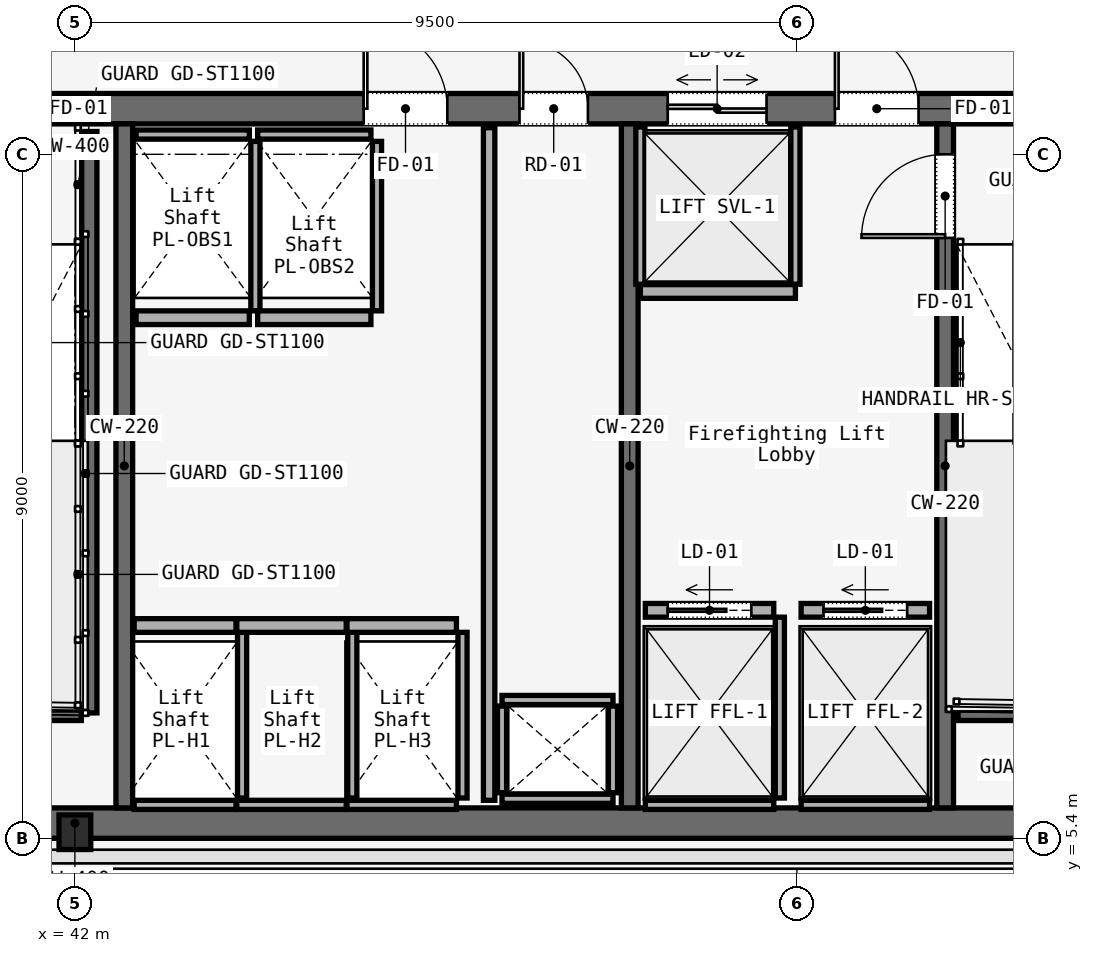
"""IFC4 building model, lengths in metres.
Left out: names, types, materials, properties, quantities, classifications, styles, units other than length and angle.
Written with IfcOpenShell. Run it as: python <this file> out.ifc"""

import sys

from ifc_helpers import new_model, si_unit, direction, frame, frame_2d, origin, origin_2d, place, context, subcontext, project, spatial, rectangle, i_section, extrude, element, fill, save


model = new_model("IFC4")
c1 = context("Model", 3, precision=1e-05, world=origin(), true_north=direction((0.0, 1.0)))
c2 = subcontext(c1, "Body", "Model", "MODEL_VIEW")
j1 = project(units=[si_unit("LENGTHUNIT", "METRE"), si_unit("PLANEANGLEUNIT", "RADIAN")], contexts=[c1])
p1 = place(None, origin())
s1 = spatial("IfcSite", under=j1, at=p1, CompositionType="ELEMENT")
p2 = place(p1, origin())
s2 = spatial("IfcBuilding", under=s1, at=p2, CompositionType="ELEMENT")
p3 = place(p2, frame((0.0, 0.0, 187.8)))
s3 = spatial("IfcBuildingStorey", under=s2, at=p3, CompositionType="ELEMENT", Elevation=187.8)
p4 = place(p3, frame((26.45, 15.0, 0.0), z_axis=(0.0, 0.0, 1.0), x_axis=(1.0, 0.0, 0.0)))
e1 = element("IfcWall", 1, at=p4, inside=s3, PredefinedType="SOLIDWALL", context=c2, shape_type="SweptSolid", body=[
    extrude(rectangle(XDim=31.1, YDim=0.4, at=frame_2d((15.55, 0.0))), origin(), (0.0, 0.0, 1.0), 3.58),
])
p5 = place(p4, frame((1.65, 0.0, 0.0)))
e2 = element("IfcOpeningElement", 2, at=p5, cuts=e1, PredefinedType="OPENING", context=c2, shape_type="SweptSolid", body=[
    extrude(rectangle(XDim=1.1, YDim=2.2, at=frame_2d((0.55, 1.1))), frame((0.0, 0.2, 0.0), z_axis=(0.0, -1.0, 0.0), x_axis=(1.0, 0.0, 0.0)), (0.0, 0.0, 1.0), 0.4),
])
p6 = place(p4, frame((13.65, 0.0, 0.0)))
e3 = element("IfcOpeningElement", 3, at=p6, cuts=e1, PredefinedType="OPENING", context=c2, shape_type="SweptSolid", body=[
    extrude(rectangle(XDim=1.1, YDim=2.2, at=frame_2d((0.55, 1.1))), frame((0.0, 0.2, 0.0), z_axis=(0.0, -1.0, 0.0), x_axis=(1.0, 0.0, 0.0)), (0.0, 0.0, 1.0), 0.4),
])
p7 = place(p4, frame((25.55, 0.0, 0.0)))
e4 = element("IfcOpeningElement", 4, at=p7, cuts=e1, PredefinedType="OPENING", context=c2, shape_type="SweptSolid", body=[
    extrude(rectangle(XDim=1.1, YDim=2.2, at=frame_2d((0.55, 1.1))), frame((0.0, 0.2, 0.0), z_axis=(0.0, -1.0, 0.0), x_axis=(1.0, 0.0, 0.0)), (0.0, 0.0, 1.0), 0.4),
])
p8 = place(p4, frame((10.7, 0.0, 0.0)))
e5 = element("IfcOpeningElement", 5, at=p8, cuts=e1, PredefinedType="OPENING", context=c2, shape_type="SweptSolid", body=[
    extrude(rectangle(XDim=1.4, YDim=2.2, at=frame_2d((0.7, 1.1))), frame((0.0, 0.2, 0.0), z_axis=(0.0, -1.0, 0.0), x_axis=(1.0, 0.0, 0.0)), (0.0, 0.0, 1.0), 0.4),
])
p9 = place(p4, frame((19.35, 0.0, 0.0)))
e6 = element("IfcOpeningElement", 6, at=p9, cuts=e1, PredefinedType="OPENING", context=c2, shape_type="SweptSolid", body=[
    extrude(rectangle(XDim=1.1, YDim=2.2, at=frame_2d((0.55, 1.1))), frame((0.0, 0.2, 0.0), z_axis=(0.0, -1.0, 0.0), x_axis=(1.0, 0.0, 0.0)), (0.0, 0.0, 1.0), 0.4),
])
p10 = place(p4, frame((21.4, 0.0, 0.0)))
e7 = element("IfcOpeningElement", 7, at=p10, cuts=e1, PredefinedType="OPENING", context=c2, shape_type="SweptSolid", body=[
    extrude(rectangle(XDim=0.9, YDim=2.1, at=frame_2d((0.45, 1.05))), frame((0.0, 0.2, 0.0), z_axis=(0.0, -1.0, 0.0), x_axis=(1.0, 0.0, 0.0)), (0.0, 0.0, 1.0), 0.4),
])
p11 = place(p4, frame((23.35, 0.0, 0.0)))
e8 = element("IfcOpeningElement", 8, at=p11, cuts=e1, PredefinedType="OPENING", context=c2, shape_type="SweptSolid", body=[
    extrude(rectangle(XDim=1.3, YDim=2.3, at=frame_2d((0.65, 1.15))), frame((0.0, 0.2, 0.0), z_axis=(0.0, -1.0, 0.0), x_axis=(1.0, 0.0, 0.0)), (0.0, 0.0, 1.0), 0.4),
])
p12 = place(p3, frame((26.45, 5.6, 0.0), z_axis=(0.0, 0.0, 1.0), x_axis=(1.0, 0.0, 0.0)))
e9 = element("IfcWall", 9, at=p12, inside=s3, PredefinedType="SOLIDWALL", context=c2, shape_type="SweptSolid", body=[
    extrude(rectangle(XDim=31.1, YDim=0.4, at=frame_2d((15.55, 0.0))), origin(), (0.0, 0.0, 1.0), 3.58),
])
for number, where, z_axis, x_axis in (
    (10, (42.65, 5.8, 0.0), (0.0, 0.0, 1.0), (0.0, 1.0, 0.0)),
    (11, (49.3, 5.8, 0.0), (0.0, 0.0, 1.0), (0.0, 1.0, 0.0)),
):
    element("IfcWall", number, at=place(p3, frame(where, z_axis=z_axis, x_axis=x_axis)), inside=s3, PredefinedType="SOLIDWALL", context=c2, shape_type="SweptSolid", body=[
        extrude(rectangle(XDim=9.0, YDim=0.22, at=frame_2d((4.5, 0.0))), origin(), (0.0, 0.0, 1.0), 3.58),
    ])
p13 = place(p3, frame((53.45, 5.8, 0.0), z_axis=(0.0, 0.0, 1.0), x_axis=(0.0, 1.0, 0.0)))
e12 = element("IfcWall", 12, at=p13, inside=s3, PredefinedType="SOLIDWALL", context=c2, shape_type="SweptSolid", body=[
    extrude(rectangle(XDim=9.0, YDim=0.22, at=frame_2d((4.5, 0.0))), origin(), (0.0, 0.0, 1.0), 3.58),
])
p14 = place(p13, frame((7.5, 0.0, 0.0)))
e13 = element("IfcOpeningElement", 13, at=p14, cuts=e12, PredefinedType="OPENING", context=c2, shape_type="SweptSolid", body=[
    extrude(rectangle(XDim=1.1, YDim=2.2, at=frame_2d((0.55, 1.1))), frame((0.0, 0.11, 0.0), z_axis=(0.0, -1.0, 0.0), x_axis=(1.0, 0.0, 0.0)), (0.0, 0.0, 1.0), 0.22),
])
p15 = place(p3, frame((42.0, 5.48, 0.0), z_axis=(0.0, 0.0, 1.0), x_axis=(1.0, 0.0, 0.0)))
e14 = element("IfcColumn", 14, at=p15, inside=s3, PredefinedType="COLUMN", context=c2, shape_type="SweptSolid", body=[
    extrude(i_section(OverallWidth=0.418, OverallDepth=0.455, WebThickness=0.042, FlangeThickness=0.052, FilletRadius=0.015, at=origin_2d()), origin(), (0.0, 0.0, 1.0), 3.58),
])
p16 = place(p3, frame((42.19, 14.7, 0.0), z_axis=(0.0, 0.0, 1.0), x_axis=(0.0, -1.0, 0.0)))
e15 = element("IfcWall", 15, at=p16, inside=s3, PredefinedType="SOLIDWALL", context=c2, shape_type="SweptSolid", body=[
    extrude(rectangle(XDim=7.65, YDim=0.2, at=frame_2d((3.825, 0.0))), origin(), (0.0, 0.0, 1.0), 3.8),
])
for number, where, z_axis, x_axis in (
    (16, (38.97, 7.05, 0.0), (0.0, 0.0, 1.0), (1.0, 0.0, 0.0)),
    (17, (53.62, 7.05, 0.0), (0.0, 0.0, 1.0), (1.0, 0.0, 0.0)),
):
    element("IfcWall", number, at=place(p3, frame(where, z_axis=z_axis, x_axis=x_axis)), inside=s3, PredefinedType="SOLIDWALL", context=c2, shape_type="SweptSolid", body=[
        extrude(rectangle(XDim=3.115, YDim=0.2, at=frame_2d((1.558, 0.0))), origin(), (0.0, 0.0, 1.0), 3.8),
    ])
for number, where, z_axis, x_axis in (
    (18, (47.62, 5.92, 0.0), (0.0, 0.0, 1.0), (1.0, 0.0, 0.0)),
    (19, (47.62, 7.22, 0.0), (0.0, 0.0, 1.0), (1.0, 0.0, 0.0)),
):
    element("IfcWall", number, at=place(p3, frame(where, z_axis=z_axis, x_axis=x_axis)), inside=s3, PredefinedType="SOLIDWALL", context=c2, shape_type="SweptSolid", body=[
        extrude(rectangle(XDim=1.46, YDim=0.12, at=frame_2d((0.73, 0.0))), origin(), (0.0, 0.0, 1.0), 3.01),
    ])
for number, where, z_axis, x_axis in (
    (20, (47.62, 6.0, 0.0), (0.0, 0.0, 1.0), (0.0, 1.0, 0.0)),
    (21, (49.08, 6.0, 0.0), (0.0, 0.0, 1.0), (0.0, 1.0, 0.0)),
):
    element("IfcWall", number, at=place(p3, frame(where, z_axis=z_axis, x_axis=x_axis)), inside=s3, PredefinedType="SOLIDWALL", context=c2, shape_type="SweptSolid", body=[
        extrude(rectangle(XDim=1.14, YDim=0.12, at=frame_2d((0.57, 0.0))), origin(), (0.0, 0.0, 1.0), 3.01),
    ])
p17 = place(p3, frame((47.45, 5.9, 0.0), z_axis=(0.0, 0.0, 1.0), x_axis=(0.0, 1.0, 0.0)))
e22 = element("IfcWall", 22, at=p17, inside=s3, PredefinedType="PARTITIONING", context=c2, shape_type="SweptSolid", body=[
    extrude(rectangle(XDim=8.85, YDim=0.15, at=frame_2d((4.425, 0.0))), origin(), (0.0, 0.0, 1.0), 3.01),
])
p18 = place(p3, frame((42.78, 8.2, 0.0), z_axis=(0.0, 0.0, 1.0), x_axis=(1.0, 0.0, 0.0)))
e23 = element("IfcWall", 23, at=p18, inside=s3, PredefinedType="SOLIDWALL", context=c2, shape_type="SweptSolid", body=[
    extrude(rectangle(XDim=1.34, YDim=0.18, at=frame_2d((0.67, 0.0))), origin(), (0.0, 0.0, 1.0), 3.01),
])
p19 = place(p3, frame((42.78, 5.84, 0.0), z_axis=(0.0, 0.0, 1.0), x_axis=(1.0, 0.0, 0.0)))
e24 = element("IfcWall", 24, at=p19, inside=s3, PredefinedType="SOLIDWALL", context=c2, shape_type="SweptSolid", body=[
    extrude(rectangle(XDim=1.34, YDim=0.12, at=frame_2d((0.67, 0.0))), origin(), (0.0, 0.0, 1.0), 3.01),
])
p20 = place(p3, frame((44.2, 5.93, 0.0), z_axis=(0.0, 0.0, 1.0), x_axis=(0.0, 1.0, 0.0)))
e25 = element("IfcWall", 25, at=p20, inside=s3, PredefinedType="SOLIDWALL", context=c2, shape_type="SweptSolid", body=[
    extrude(rectangle(XDim=2.18, YDim=0.12, at=frame_2d((1.09, 0.0))), origin(), (0.0, 0.0, 1.0), 3.01),
])
p21 = place(p3, frame((44.13, 8.2, 0.0), z_axis=(0.0, 0.0, 1.0), x_axis=(1.0, 0.0, 0.0)))
e26 = element("IfcWall", 26, at=p21, inside=s3, PredefinedType="SOLIDWALL", context=c2, shape_type="SweptSolid", body=[
    extrude(rectangle(XDim=1.44, YDim=0.18, at=frame_2d((0.72, 0.0))), origin(), (0.0, 0.0, 1.0), 3.01),
])
p22 = place(p3, frame((44.13, 5.84, 0.0), z_axis=(0.0, 0.0, 1.0), x_axis=(1.0, 0.0, 0.0)))
e27 = element("IfcWall", 27, at=p22, inside=s3, PredefinedType="SOLIDWALL", context=c2, shape_type="SweptSolid", body=[
    extrude(rectangle(XDim=1.44, YDim=0.12, at=frame_2d((0.72, 0.0))), origin(), (0.0, 0.0, 1.0), 3.01),
])
p23 = place(p3, frame((45.65, 5.93, 0.0), z_axis=(0.0, 0.0, 1.0), x_axis=(0.0, 1.0, 0.0)))
e28 = element("IfcWall", 28, at=p23, inside=s3, PredefinedType="SOLIDWALL", context=c2, shape_type="SweptSolid", body=[
    extrude(rectangle(XDim=2.18, YDim=0.12, at=frame_2d((1.09, 0.0))), origin(), (0.0, 0.0, 1.0), 3.01),
])
p24 = place(p3, frame((45.58, 8.2, 0.0), z_axis=(0.0, 0.0, 1.0), x_axis=(1.0, 0.0, 0.0)))
e29 = element("IfcWall", 29, at=p24, inside=s3, PredefinedType="SOLIDWALL", context=c2, shape_type="SweptSolid", body=[
    extrude(rectangle(XDim=1.44, YDim=0.18, at=frame_2d((0.72, 0.0))), origin(), (0.0, 0.0, 1.0), 3.01),
])
p25 = place(p3, frame((45.58, 5.84, 0.0), z_axis=(0.0, 0.0, 1.0), x_axis=(1.0, 0.0, 0.0)))
e30 = element("IfcWall", 30, at=p25, inside=s3, PredefinedType="SOLIDWALL", context=c2, shape_type="SweptSolid", body=[
    extrude(rectangle(XDim=1.44, YDim=0.12, at=frame_2d((0.72, 0.0))), origin(), (0.0, 0.0, 1.0), 3.01),
])
p26 = place(p3, frame((47.1, 5.93, 0.0), z_axis=(0.0, 0.0, 1.0), x_axis=(0.0, 1.0, 0.0)))
e31 = element("IfcWall", 31, at=p26, inside=s3, PredefinedType="SOLIDWALL", context=c2, shape_type="SweptSolid", body=[
    extrude(rectangle(XDim=2.18, YDim=0.12, at=frame_2d((1.09, 0.0))), origin(), (0.0, 0.0, 1.0), 3.01),
])
p27 = place(p3, frame((42.805, 12.25, 0.0), z_axis=(0.0, 0.0, 1.0), x_axis=(1.0, 0.0, 0.0)))
e32 = element("IfcWall", 32, at=p27, inside=s3, PredefinedType="SOLIDWALL", context=c2, shape_type="SweptSolid", body=[
    extrude(rectangle(XDim=1.49, YDim=0.18, at=frame_2d((0.745, 0.0))), origin(), (0.0, 0.0, 1.0), 3.01),
])
p28 = place(p3, frame((42.805, 14.66, 0.0), z_axis=(0.0, 0.0, 1.0), x_axis=(1.0, 0.0, 0.0)))
e33 = element("IfcWall", 33, at=p28, inside=s3, PredefinedType="SOLIDWALL", context=c2, shape_type="SweptSolid", body=[
    extrude(rectangle(XDim=1.49, YDim=0.12, at=frame_2d((0.745, 0.0))), origin(), (0.0, 0.0, 1.0), 3.01),
])
p29 = place(p3, frame((44.375, 12.34, 0.0), z_axis=(0.0, 0.0, 1.0), x_axis=(0.0, 1.0, 0.0)))
e34 = element("IfcWall", 34, at=p29, inside=s3, PredefinedType="SOLIDWALL", context=c2, shape_type="SweptSolid", body=[
    extrude(rectangle(XDim=2.23, YDim=0.12, at=frame_2d((1.115, 0.0))), origin(), (0.0, 0.0, 1.0), 3.01),
])
p30 = place(p3, frame((44.405, 12.25, 0.0), z_axis=(0.0, 0.0, 1.0), x_axis=(1.0, 0.0, 0.0)))
e35 = element("IfcWall", 35, at=p30, inside=s3, PredefinedType="SOLIDWALL", context=c2, shape_type="SweptSolid", body=[
    extrude(rectangle(XDim=1.49, YDim=0.18, at=frame_2d((0.745, 0.0))), origin(), (0.0, 0.0, 1.0), 3.01),
])
p31 = place(p3, frame((44.405, 14.66, 0.0), z_axis=(0.0, 0.0, 1.0), x_axis=(1.0, 0.0, 0.0)))
e36 = element("IfcWall", 36, at=p31, inside=s3, PredefinedType="SOLIDWALL", context=c2, shape_type="SweptSolid", body=[
    extrude(rectangle(XDim=1.49, YDim=0.12, at=frame_2d((0.745, 0.0))), origin(), (0.0, 0.0, 1.0), 3.01),
])
p32 = place(p3, frame((45.975, 12.34, 0.0), z_axis=(0.0, 0.0, 1.0), x_axis=(0.0, 1.0, 0.0)))
e37 = element("IfcWall", 37, at=p32, inside=s3, PredefinedType="SOLIDWALL", context=c2, shape_type="SweptSolid", body=[
    extrude(rectangle(XDim=2.23, YDim=0.12, at=frame_2d((1.115, 0.0))), origin(), (0.0, 0.0, 1.0), 3.01),
])
p33 = place(p3, frame((49.505, 8.4, 0.0), z_axis=(0.0, 0.0, 1.0), x_axis=(1.0, 0.0, 0.0)))
e38 = element("IfcWall", 38, at=p33, inside=s3, PredefinedType="SOLIDWALL", context=c2, shape_type="SweptSolid", body=[
    extrude(rectangle(XDim=1.69, YDim=0.18, at=frame_2d((0.845, 0.0))), origin(), (0.0, 0.0, 1.0), 3.01),
])
p34 = place(p33, frame((0.295, 0.0, 0.0)))
e39 = element("IfcOpeningElement", 39, at=p34, cuts=e38, PredefinedType="OPENING", context=c2, shape_type="SweptSolid", body=[
    extrude(rectangle(XDim=1.1, YDim=2.2, at=frame_2d((0.55, 1.1))), frame((0.0, 0.09, 0.0), z_axis=(0.0, -1.0, 0.0), x_axis=(1.0, 0.0, 0.0)), (0.0, 0.0, 1.0), 0.18),
])
p35 = place(p3, frame((49.505, 5.84, 0.0), z_axis=(0.0, 0.0, 1.0), x_axis=(1.0, 0.0, 0.0)))
e40 = element("IfcWall", 40, at=p35, inside=s3, PredefinedType="SOLIDWALL", context=c2, shape_type="SweptSolid", body=[
    extrude(rectangle(XDim=1.69, YDim=0.12, at=frame_2d((0.845, 0.0))), origin(), (0.0, 0.0, 1.0), 3.01),
])
p36 = place(p3, frame((51.275, 5.93, 0.0), z_axis=(0.0, 0.0, 1.0), x_axis=(0.0, 1.0, 0.0)))
e41 = element("IfcWall", 41, at=p36, inside=s3, PredefinedType="SOLIDWALL", context=c2, shape_type="SweptSolid", body=[
    extrude(rectangle(XDim=2.38, YDim=0.12, at=frame_2d((1.19, 0.0))), origin(), (0.0, 0.0, 1.0), 3.01),
])
p37 = place(p3, frame((51.555, 8.4, 0.0), z_axis=(0.0, 0.0, 1.0), x_axis=(1.0, 0.0, 0.0)))
e42 = element("IfcWall", 42, at=p37, inside=s3, PredefinedType="SOLIDWALL", context=c2, shape_type="SweptSolid", body=[
    extrude(rectangle(XDim=1.69, YDim=0.18, at=frame_2d((0.845, 0.0))), origin(), (0.0, 0.0, 1.0), 3.01),
])
p38 = place(p37, frame((0.295, 0.0, 0.0)))
e43 = element("IfcOpeningElement", 43, at=p38, cuts=e42, PredefinedType="OPENING", context=c2, shape_type="SweptSolid", body=[
    extrude(rectangle(XDim=1.1, YDim=2.2, at=frame_2d((0.55, 1.1))), frame((0.0, 0.09, 0.0), z_axis=(0.0, -1.0, 0.0), x_axis=(1.0, 0.0, 0.0)), (0.0, 0.0, 1.0), 0.18),
])
p39 = place(p3, frame((51.555, 5.84, 0.0), z_axis=(0.0, 0.0, 1.0), x_axis=(1.0, 0.0, 0.0)))
e44 = element("IfcWall", 44, at=p39, inside=s3, PredefinedType="SOLIDWALL", context=c2, shape_type="SweptSolid", body=[
    extrude(rectangle(XDim=1.69, YDim=0.12, at=frame_2d((0.845, 0.0))), origin(), (0.0, 0.0, 1.0), 3.01),
])
p40 = place(p3, frame((49.44, 12.595, 0.0), z_axis=(0.0, 0.0, 1.0), x_axis=(1.0, 0.0, 0.0)))
e45 = element("IfcWall", 45, at=p40, inside=s3, PredefinedType="SOLIDWALL", context=c2, shape_type="SweptSolid", body=[
    extrude(rectangle(XDim=2.04, YDim=0.18, at=frame_2d((1.02, 0.0))), origin(), (0.0, 0.0, 1.0), 3.01),
])
for number, where, z_axis, x_axis in (
    (46, (49.44, 12.69, 0.0), (0.0, 0.0, 1.0), (0.0, 1.0, 0.0)),
    (47, (51.48, 12.69, 0.0), (0.0, 0.0, 1.0), (0.0, 1.0, 0.0)),
):
    element("IfcWall", number, at=place(p3, frame(where, z_axis=z_axis, x_axis=x_axis)), inside=s3, PredefinedType="SOLIDWALL", context=c2, shape_type="SweptSolid", body=[
        extrude(rectangle(XDim=2.07, YDim=0.12, at=frame_2d((1.035, 0.0))), origin(), (0.0, 0.0, 1.0), 3.01),
    ])
p41 = place(p7, origin())
e48 = element("IfcDoor", 48, at=p41, inside=s3, OperationType="SINGLE_SWING_RIGHT", PredefinedType="DOOR", context=c2, shape_type="SweptSolid", body=[
    extrude(rectangle(XDim=1.1, YDim=2.2, at=frame_2d((0.55, 1.1))), frame((0.0, 0.025, 0.0), z_axis=(0.0, -1.0, 0.0), x_axis=(1.0, 0.0, 0.0)), (0.0, 0.0, 1.0), 0.05),
])
fill(e4, e48)
p42 = place(p9, origin())
e49 = element("IfcDoor", 49, at=p42, inside=s3, OperationType="SINGLE_SWING_LEFT", PredefinedType="DOOR", context=c2, shape_type="SweptSolid", body=[
    extrude(rectangle(XDim=1.1, YDim=2.2, at=frame_2d((0.55, 1.1))), frame((0.0, 0.025, 0.0), z_axis=(0.0, -1.0, 0.0), x_axis=(1.0, 0.0, 0.0)), (0.0, 0.0, 1.0), 0.05),
])
fill(e6, e49)
p43 = place(p10, origin())
e50 = element("IfcDoor", 50, at=p43, inside=s3, OperationType="SINGLE_SWING_LEFT", PredefinedType="DOOR", context=c2, shape_type="SweptSolid", body=[
    extrude(rectangle(XDim=0.9, YDim=2.1, at=frame_2d((0.45, 1.05))), frame((0.0, 0.025, 0.0), z_axis=(0.0, -1.0, 0.0), x_axis=(1.0, 0.0, 0.0)), (0.0, 0.0, 1.0), 0.05),
])
fill(e7, e50)
p44 = place(p14, origin())
e51 = element("IfcDoor", 51, at=p44, inside=s3, OperationType="SINGLE_SWING_LEFT", PredefinedType="DOOR", context=c2, shape_type="SweptSolid", body=[
    extrude(rectangle(XDim=1.1, YDim=2.2, at=frame_2d((0.55, 1.1))), frame((0.0, 0.025, 0.0), z_axis=(0.0, -1.0, 0.0), x_axis=(1.0, 0.0, 0.0)), (0.0, 0.0, 1.0), 0.05),
])
fill(e13, e51)
p45 = place(p34, origin())
e52 = element("IfcDoor", 52, at=p45, inside=s3, OperationType="SLIDING_TO_LEFT", PredefinedType="DOOR", context=c2, shape_type="SweptSolid", body=[
    extrude(rectangle(XDim=1.1, YDim=2.2, at=frame_2d((0.55, 1.1))), frame((0.0, 0.025, 0.0), z_axis=(0.0, -1.0, 0.0), x_axis=(1.0, 0.0, 0.0)), (0.0, 0.0, 1.0), 0.05),
])
fill(e39, e52)
p46 = place(p38, origin())
e53 = element("IfcDoor", 53, at=p46, inside=s3, OperationType="SLIDING_TO_LEFT", PredefinedType="DOOR", context=c2, shape_type="SweptSolid", body=[
    extrude(rectangle(XDim=1.1, YDim=2.2, at=frame_2d((0.55, 1.1))), frame((0.0, 0.025, 0.0), z_axis=(0.0, -1.0, 0.0), x_axis=(1.0, 0.0, 0.0)), (0.0, 0.0, 1.0), 0.05),
])
fill(e43, e53)
p47 = place(p11, origin())
e54 = element("IfcDoor", 54, at=p47, inside=s3, OperationType="DOUBLE_DOOR_SLIDING", PredefinedType="DOOR", context=c2, shape_type="SweptSolid", body=[
    extrude(rectangle(XDim=1.3, YDim=2.3, at=frame_2d((0.65, 1.15))), frame((0.0, 0.025, 0.0), z_axis=(0.0, -1.0, 0.0), x_axis=(1.0, 0.0, 0.0)), (0.0, 0.0, 1.0), 0.05),
])
fill(e8, e54)
save(model, sys.argv[1])
